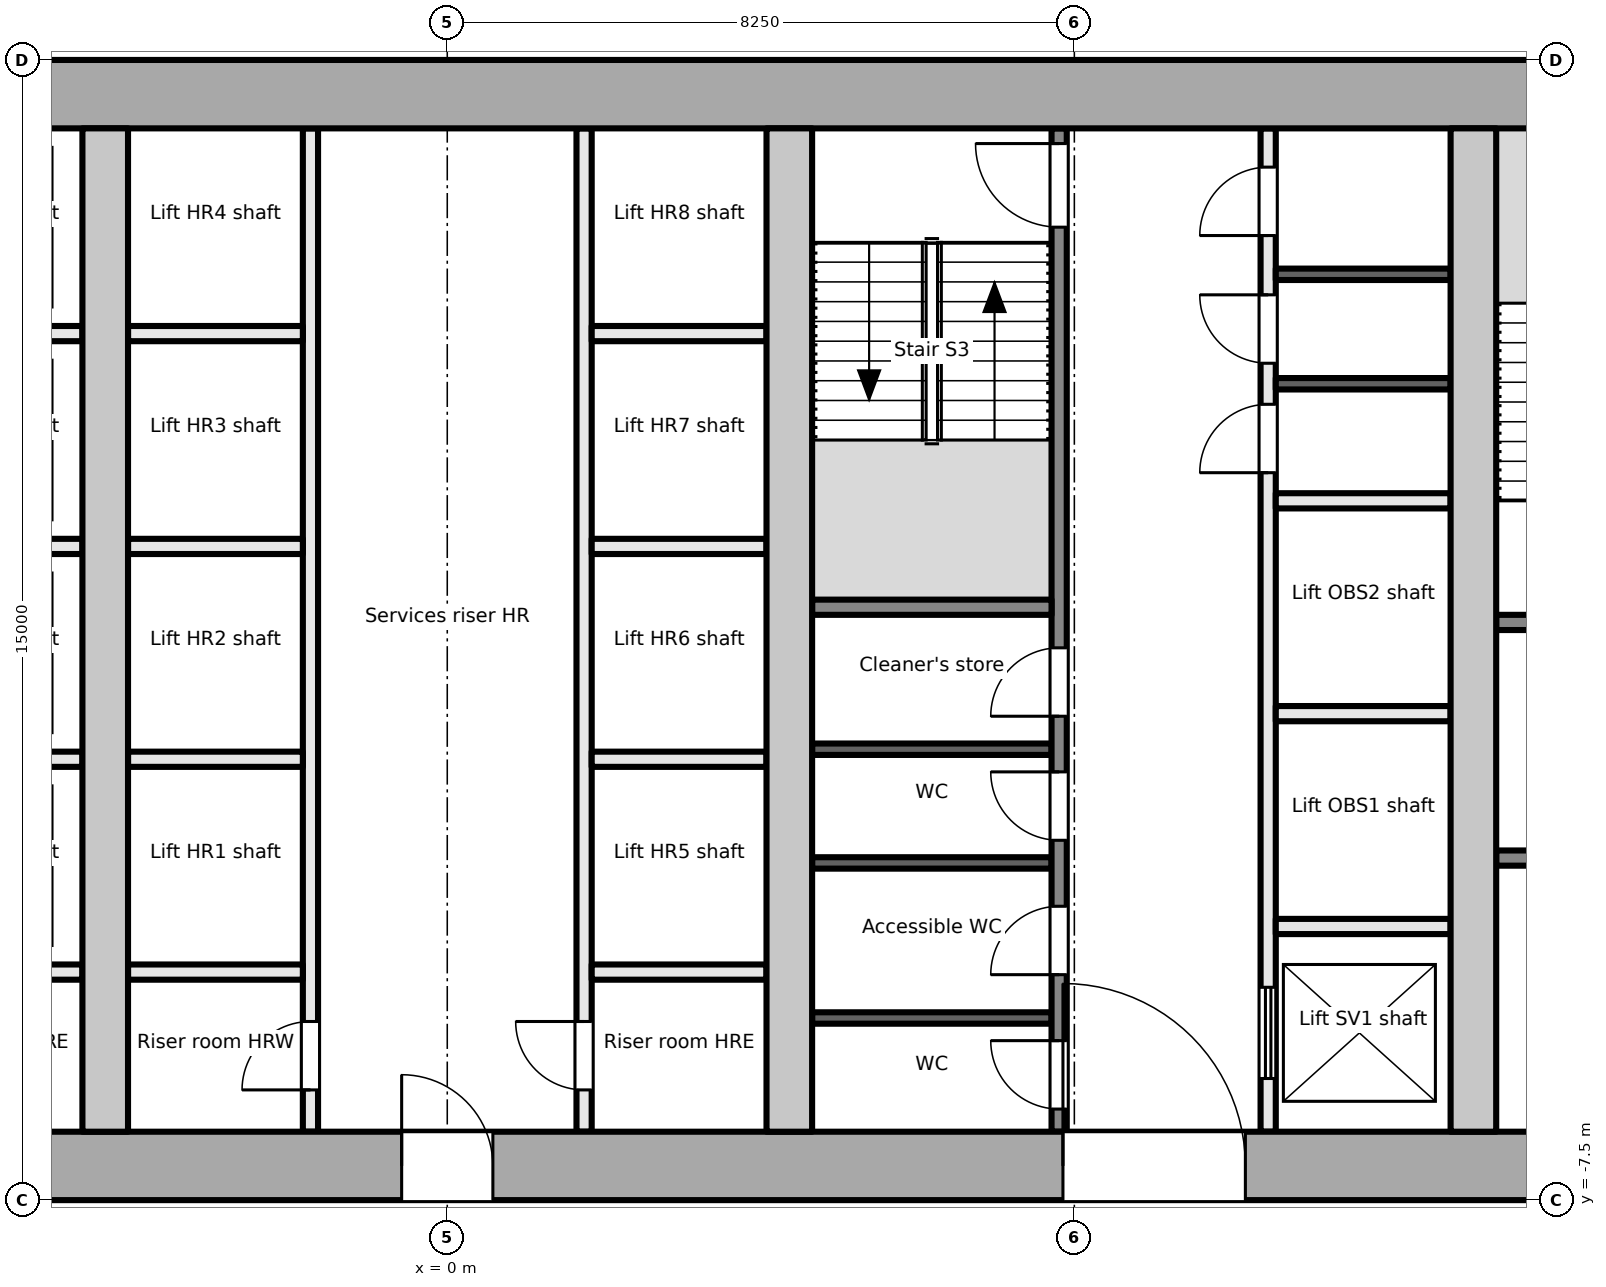
"""IFC4 building model, lengths in metres.
Left out: names, types, materials, properties, quantities, classifications, styles, units other than length and angle.
Written with IfcOpenShell. Run it as: python <this file> out.ifc"""

import sys

from ifc_helpers import new_model, si_unit, direction, frame, frame_2d, origin, place, context, subcontext, project, spatial, rectangle, extrude, element, fill, save


model = new_model("IFC4")
c1 = context("Model", 3, precision=1e-05, world=origin(), true_north=direction((0.0, 1.0)))
c2 = subcontext(c1, "Body", "Model", "MODEL_VIEW")
j1 = project(units=[si_unit("LENGTHUNIT", "METRE"), si_unit("PLANEANGLEUNIT", "RADIAN")], contexts=[c1])
p1 = place(None, origin())
s1 = spatial("IfcSite", under=j1, at=p1, CompositionType="ELEMENT")
p2 = place(p1, origin())
s2 = spatial("IfcBuilding", under=s1, at=p2, CompositionType="ELEMENT")
p3 = place(p2, frame((0.0, 0.0, 57.0)))
s3 = spatial("IfcBuildingStorey", under=s2, at=p3, CompositionType="ELEMENT", Elevation=57.0)
p4 = place(p3, frame((-18.0, -7.05, -0.2), z_axis=(0.0, 0.0, 1.0), x_axis=(1.0, 0.0, 0.0)))
e1 = element("IfcWall", 1, at=p4, inside=s3, PredefinedType="SHEAR", context=c2, shape_type="SweptSolid", body=[
    extrude(rectangle(XDim=36.0, YDim=0.9, at=frame_2d((18.0, 0.0))), origin(), (0.0, 0.0, 1.0), 4.1),
])
p5 = place(p4, frame((7.8, 0.0, 0.2)))
e2 = element("IfcOpeningElement", 2, at=p5, cuts=e1, PredefinedType="OPENING", context=c2, shape_type="SweptSolid", body=[
    extrude(rectangle(XDim=2.4, YDim=2.1, at=frame_2d((1.2, 1.05))), frame((0.0, 0.46, 0.0), z_axis=(0.0, -1.0, 0.0), x_axis=(1.0, 0.0, 0.0)), (0.0, 0.0, 1.0), 0.921),
])
p6 = place(p4, frame((17.4, 0.0, 0.2)))
e3 = element("IfcOpeningElement", 3, at=p6, cuts=e1, PredefinedType="OPENING", context=c2, shape_type="SweptSolid", body=[
    extrude(rectangle(XDim=1.2, YDim=2.1, at=frame_2d((0.6, 1.05))), frame((0.0, 0.46, 0.0), z_axis=(0.0, -1.0, 0.0), x_axis=(1.0, 0.0, 0.0)), (0.0, 0.0, 1.0), 0.921),
])
p7 = place(p4, frame((26.1, 0.0, 0.2)))
e4 = element("IfcOpeningElement", 4, at=p7, cuts=e1, PredefinedType="OPENING", context=c2, shape_type="SweptSolid", body=[
    extrude(rectangle(XDim=2.4, YDim=2.1, at=frame_2d((1.2, 1.05))), frame((0.0, 0.46, 0.0), z_axis=(0.0, -1.0, 0.0), x_axis=(1.0, 0.0, 0.0)), (0.0, 0.0, 1.0), 0.921),
])
p8 = place(p3, frame((-18.0, 7.05, -0.2), z_axis=(0.0, 0.0, 1.0), x_axis=(1.0, 0.0, 0.0)))
e5 = element("IfcWall", 5, at=p8, inside=s3, PredefinedType="SHEAR", context=c2, shape_type="SweptSolid", body=[
    extrude(rectangle(XDim=36.0, YDim=0.9, at=frame_2d((18.0, 0.0))), origin(), (0.0, 0.0, 1.0), 4.1),
])
for number, where, z_axis, x_axis in (
    (6, (-4.5, -6.6, -0.2), (0.0, 0.0, 1.0), (0.0, 1.0, 0.0)),
    (7, (4.5, -6.6, -0.2), (0.0, 0.0, 1.0), (0.0, 1.0, 0.0)),
    (8, (13.5, -6.6, -0.2), (0.0, 0.0, 1.0), (0.0, 1.0, 0.0)),
):
    element("IfcWall", number, at=place(p3, frame(where, z_axis=z_axis, x_axis=x_axis)), inside=s3, PredefinedType="SHEAR", context=c2, shape_type="SweptSolid", body=[
        extrude(rectangle(XDim=13.2, YDim=0.6, at=frame_2d((6.6, 0.0))), origin(), (0.0, 0.0, 1.0), 4.1),
    ])
p9 = place(p3, frame((13.8, -3.0, 0.0), z_axis=(0.0, 0.0, 1.0), x_axis=(1.0, 0.0, 0.0)))
e9 = element("IfcWall", 9, at=p9, inside=s3, PredefinedType="PARTITIONING", context=c2, shape_type="SweptSolid", body=[
    extrude(rectangle(XDim=3.3, YDim=0.2, at=frame_2d((1.65, 0.0))), origin(), (0.0, 0.0, 1.0), 3.9),
])
p10 = place(p9, frame((1.1, 0.0, 0.0)))
e10 = element("IfcOpeningElement", 10, at=p10, cuts=e9, PredefinedType="OPENING", context=c2, shape_type="SweptSolid", body=[
    extrude(rectangle(XDim=1.1, YDim=2.1, at=frame_2d((0.55, 1.05))), frame((0.0, 0.111, 0.0), z_axis=(0.0, -1.0, 0.0), x_axis=(1.0, 0.0, 0.0)), (0.0, 0.0, 1.0), 0.221),
])
p11 = place(p3, frame((13.8, 0.1, 0.0), z_axis=(0.0, 0.0, 1.0), x_axis=(1.0, 0.0, 0.0)))
e11 = element("IfcWall", 11, at=p11, inside=s3, PredefinedType="PARTITIONING", context=c2, shape_type="SweptSolid", body=[
    extrude(rectangle(XDim=3.3, YDim=0.2, at=frame_2d((1.65, 0.0))), origin(), (0.0, 0.0, 1.0), 3.9),
])
p12 = place(p11, frame((1.1, 0.0, 0.0)))
e12 = element("IfcOpeningElement", 12, at=p12, cuts=e11, PredefinedType="OPENING", context=c2, shape_type="SweptSolid", body=[
    extrude(rectangle(XDim=1.1, YDim=2.1, at=frame_2d((0.55, 1.05))), frame((0.0, 0.111, 0.0), z_axis=(0.0, -1.0, 0.0), x_axis=(1.0, 0.0, 0.0)), (0.0, 0.0, 1.0), 0.221),
])
for number, where, z_axis, x_axis in (
    (13, (-7.1, -1.7, 0.0), (0.0, 0.0, 1.0), (1.0, 0.0, 0.0)),
    (14, (-7.1, 1.1, 0.0), (0.0, 0.0, 1.0), (1.0, 0.0, 0.0)),
    (15, (-7.1, 3.9, 0.0), (0.0, 0.0, 1.0), (1.0, 0.0, 0.0)),
    (16, (-7.1, -4.5, 0.0), (0.0, 0.0, 1.0), (1.0, 0.0, 0.0)),
):
    element("IfcWall", number, at=place(p3, frame(where, z_axis=z_axis, x_axis=x_axis)), inside=s3, PredefinedType="PARTITIONING", context=c2, shape_type="SweptSolid", body=[
        extrude(rectangle(XDim=2.3, YDim=0.2, at=frame_2d((1.15, 0.0))), origin(), (0.0, 0.0, 1.0), 3.9),
    ])
p13 = place(p3, frame((-1.8, -6.6, 0.0), z_axis=(0.0, 0.0, 1.0), x_axis=(0.0, 1.0, 0.0)))
e17 = element("IfcWall", 17, at=p13, inside=s3, PredefinedType="PARTITIONING", context=c2, shape_type="SweptSolid", body=[
    extrude(rectangle(XDim=13.2, YDim=0.2, at=frame_2d((6.6, 0.0))), origin(), (0.0, 0.0, 1.0), 3.9),
])
p14 = place(p13, frame((0.55, 0.0, 0.0)))
e18 = element("IfcOpeningElement", 18, at=p14, cuts=e17, PredefinedType="OPENING", context=c2, shape_type="SweptSolid", body=[
    extrude(rectangle(XDim=0.9, YDim=2.1, at=frame_2d((0.45, 1.05))), frame((0.0, 0.111, 0.0), z_axis=(0.0, -1.0, 0.0), x_axis=(1.0, 0.0, 0.0)), (0.0, 0.0, 1.0), 0.221),
])
p15 = place(p3, frame((1.8, -6.6, 0.0), z_axis=(0.0, 0.0, 1.0), x_axis=(0.0, 1.0, 0.0)))
e19 = element("IfcWall", 19, at=p15, inside=s3, PredefinedType="PARTITIONING", context=c2, shape_type="SweptSolid", body=[
    extrude(rectangle(XDim=13.2, YDim=0.2, at=frame_2d((6.6, 0.0))), origin(), (0.0, 0.0, 1.0), 3.9),
])
p16 = place(p15, frame((0.55, 0.0, 0.0)))
e20 = element("IfcOpeningElement", 20, at=p16, cuts=e19, PredefinedType="OPENING", context=c2, shape_type="SweptSolid", body=[
    extrude(rectangle(XDim=0.9, YDim=2.1, at=frame_2d((0.45, 1.05))), frame((0.0, 0.111, 0.0), z_axis=(0.0, -1.0, 0.0), x_axis=(1.0, 0.0, 0.0)), (0.0, 0.0, 1.0), 0.221),
])
for number, where, z_axis, x_axis in (
    (21, (-4.2, -1.7, 0.0), (0.0, 0.0, 1.0), (1.0, 0.0, 0.0)),
    (22, (-4.2, 1.1, 0.0), (0.0, 0.0, 1.0), (1.0, 0.0, 0.0)),
    (23, (-4.2, 3.9, 0.0), (0.0, 0.0, 1.0), (1.0, 0.0, 0.0)),
    (24, (-4.2, -4.5, 0.0), (0.0, 0.0, 1.0), (1.0, 0.0, 0.0)),
    (25, (1.9, -1.7, 0.0), (0.0, 0.0, 1.0), (1.0, 0.0, 0.0)),
    (26, (1.9, 1.1, 0.0), (0.0, 0.0, 1.0), (1.0, 0.0, 0.0)),
    (27, (1.9, 3.9, 0.0), (0.0, 0.0, 1.0), (1.0, 0.0, 0.0)),
    (28, (1.9, -4.5, 0.0), (0.0, 0.0, 1.0), (1.0, 0.0, 0.0)),
):
    element("IfcWall", number, at=place(p3, frame(where, z_axis=z_axis, x_axis=x_axis)), inside=s3, PredefinedType="PARTITIONING", context=c2, shape_type="SweptSolid", body=[
        extrude(rectangle(XDim=2.3, YDim=0.2, at=frame_2d((1.15, 0.0))), origin(), (0.0, 0.0, 1.0), 3.9),
    ])
p17 = place(p3, frame((8.05, -6.6, 0.0), z_axis=(0.0, 0.0, 1.0), x_axis=(0.0, 1.0, 0.0)))
e29 = element("IfcWall", 29, at=p17, inside=s3, PredefinedType="PARTITIONING", context=c2, shape_type="SweptSolid", body=[
    extrude(rectangle(XDim=13.2, YDim=0.2, at=frame_2d((6.6, 0.0))), origin(), (0.0, 0.0, 1.0), 3.9),
])
p18 = place(p17, frame((0.298, 0.0, 0.0)))
e30 = element("IfcOpeningElement", 30, at=p18, cuts=e29, PredefinedType="OPENING", context=c2, shape_type="SweptSolid", body=[
    extrude(rectangle(XDim=0.9, YDim=2.1, at=frame_2d((0.45, 1.05))), frame((0.0, 0.111, 0.0), z_axis=(0.0, -1.0, 0.0), x_axis=(1.0, 0.0, 0.0)), (0.0, 0.0, 1.0), 0.221),
])
p19 = place(p17, frame((2.066, 0.0, 0.0)))
e31 = element("IfcOpeningElement", 31, at=p19, cuts=e29, PredefinedType="OPENING", context=c2, shape_type="SweptSolid", body=[
    extrude(rectangle(XDim=0.9, YDim=2.1, at=frame_2d((0.45, 1.05))), frame((0.0, 0.111, 0.0), z_axis=(0.0, -1.0, 0.0), x_axis=(1.0, 0.0, 0.0)), (0.0, 0.0, 1.0), 0.221),
])
p20 = place(p17, frame((3.834, 0.0, 0.0)))
e32 = element("IfcOpeningElement", 32, at=p20, cuts=e29, PredefinedType="OPENING", context=c2, shape_type="SweptSolid", body=[
    extrude(rectangle(XDim=0.9, YDim=2.1, at=frame_2d((0.45, 1.05))), frame((0.0, 0.111, 0.0), z_axis=(0.0, -1.0, 0.0), x_axis=(1.0, 0.0, 0.0)), (0.0, 0.0, 1.0), 0.221),
])
p21 = place(p17, frame((5.466, 0.0, 0.0)))
e33 = element("IfcOpeningElement", 33, at=p21, cuts=e29, PredefinedType="OPENING", context=c2, shape_type="SweptSolid", body=[
    extrude(rectangle(XDim=0.9, YDim=2.1, at=frame_2d((0.45, 1.05))), frame((0.0, 0.111, 0.0), z_axis=(0.0, -1.0, 0.0), x_axis=(1.0, 0.0, 0.0)), (0.0, 0.0, 1.0), 0.221),
])
p22 = place(p17, frame((11.9, 0.0, 0.0)))
e34 = element("IfcOpeningElement", 34, at=p22, cuts=e29, PredefinedType="OPENING", context=c2, shape_type="SweptSolid", body=[
    extrude(rectangle(XDim=1.1, YDim=2.1, at=frame_2d((0.55, 1.05))), frame((0.0, 0.111, 0.0), z_axis=(0.0, -1.0, 0.0), x_axis=(1.0, 0.0, 0.0)), (0.0, 0.0, 1.0), 0.221),
])
p23 = place(p3, frame((10.8, -6.6, 0.0), z_axis=(0.0, 0.0, 1.0), x_axis=(0.0, 1.0, 0.0)))
e35 = element("IfcWall", 35, at=p23, inside=s3, PredefinedType="PARTITIONING", context=c2, shape_type="SweptSolid", body=[
    extrude(rectangle(XDim=13.2, YDim=0.2, at=frame_2d((6.6, 0.0))), origin(), (0.0, 0.0, 1.0), 3.9),
])
p24 = place(p23, frame((0.7, 0.0, 0.0)))
e36 = element("IfcOpeningElement", 36, at=p24, cuts=e35, PredefinedType="OPENING", context=c2, shape_type="SweptSolid", body=[
    extrude(rectangle(XDim=1.2, YDim=2.1, at=frame_2d((0.6, 1.05))), frame((0.0, 0.111, 0.0), z_axis=(0.0, -1.0, 0.0), x_axis=(1.0, 0.0, 0.0)), (0.0, 0.0, 1.0), 0.221),
])
p25 = place(p23, frame((8.67, 0.0, 0.0)))
e37 = element("IfcOpeningElement", 37, at=p25, cuts=e35, PredefinedType="OPENING", context=c2, shape_type="SweptSolid", body=[
    extrude(rectangle(XDim=0.9, YDim=2.1, at=frame_2d((0.45, 1.05))), frame((0.0, 0.111, 0.0), z_axis=(0.0, -1.0, 0.0), x_axis=(1.0, 0.0, 0.0)), (0.0, 0.0, 1.0), 0.221),
])
p26 = place(p23, frame((10.11, 0.0, 0.0)))
e38 = element("IfcOpeningElement", 38, at=p26, cuts=e35, PredefinedType="OPENING", context=c2, shape_type="SweptSolid", body=[
    extrude(rectangle(XDim=0.9, YDim=2.1, at=frame_2d((0.45, 1.05))), frame((0.0, 0.111, 0.0), z_axis=(0.0, -1.0, 0.0), x_axis=(1.0, 0.0, 0.0)), (0.0, 0.0, 1.0), 0.221),
])
p27 = place(p23, frame((11.79, 0.0, 0.0)))
e39 = element("IfcOpeningElement", 39, at=p27, cuts=e35, PredefinedType="OPENING", context=c2, shape_type="SweptSolid", body=[
    extrude(rectangle(XDim=0.9, YDim=2.1, at=frame_2d((0.45, 1.05))), frame((0.0, 0.111, 0.0), z_axis=(0.0, -1.0, 0.0), x_axis=(1.0, 0.0, 0.0)), (0.0, 0.0, 1.0), 0.221),
])
p28 = place(p3, frame((4.8, 0.3, 0.0), z_axis=(0.0, 0.0, 1.0), x_axis=(1.0, 0.0, 0.0)))
e40 = element("IfcWall", 40, at=p28, inside=s3, PredefinedType="PARTITIONING", context=c2, shape_type="SweptSolid", body=[
    extrude(rectangle(XDim=3.15, YDim=0.2, at=frame_2d((1.575, 0.0))), origin(), (0.0, 0.0, 1.0), 3.9),
])
for number, where, z_axis, x_axis in (
    (41, (4.8, -5.104, 0.0), (0.0, 0.0, 1.0), (1.0, 0.0, 0.0)),
    (42, (4.8, -3.064, 0.0), (0.0, 0.0, 1.0), (1.0, 0.0, 0.0)),
    (43, (4.8, -1.568, 0.0), (0.0, 0.0, 1.0), (1.0, 0.0, 0.0)),
):
    element("IfcWall", number, at=place(p3, frame(where, z_axis=z_axis, x_axis=x_axis)), inside=s3, PredefinedType="PARTITIONING", context=c2, shape_type="SweptSolid", body=[
        extrude(rectangle(XDim=3.15, YDim=0.15, at=frame_2d((1.575, 0.0))), origin(), (0.0, 0.0, 1.0), 3.9),
    ])
for number, where, z_axis, x_axis in (
    (44, (10.9, -3.9, 0.0), (0.0, 0.0, 1.0), (1.0, 0.0, 0.0)),
    (45, (10.9, -1.1, 0.0), (0.0, 0.0, 1.0), (1.0, 0.0, 0.0)),
    (46, (10.9, 1.7, 0.0), (0.0, 0.0, 1.0), (1.0, 0.0, 0.0)),
):
    element("IfcWall", number, at=place(p3, frame(where, z_axis=z_axis, x_axis=x_axis)), inside=s3, PredefinedType="PARTITIONING", context=c2, shape_type="SweptSolid", body=[
        extrude(rectangle(XDim=2.3, YDim=0.2, at=frame_2d((1.15, 0.0))), origin(), (0.0, 0.0, 1.0), 3.9),
    ])
for number, where, z_axis, x_axis in (
    (47, (10.9, 3.24, 0.0), (0.0, 0.0, 1.0), (1.0, 0.0, 0.0)),
    (48, (10.9, 4.68, 0.0), (0.0, 0.0, 1.0), (1.0, 0.0, 0.0)),
):
    element("IfcWall", number, at=place(p3, frame(where, z_axis=z_axis, x_axis=x_axis)), inside=s3, PredefinedType="PARTITIONING", context=c2, shape_type="SweptSolid", body=[
        extrude(rectangle(XDim=2.3, YDim=0.15, at=frame_2d((1.15, 0.0))), origin(), (0.0, 0.0, 1.0), 3.9),
    ])
p29 = place(p14, origin())
e49 = element("IfcDoor", 49, at=p29, inside=s3, OperationType="SINGLE_SWING_LEFT", PredefinedType="DOOR", context=c2, shape_type="SweptSolid", body=[
    extrude(rectangle(XDim=0.9, YDim=2.1, at=frame_2d((0.45, 1.05))), frame((0.0, 0.025, 0.0), z_axis=(0.0, -1.0, 0.0), x_axis=(1.0, 0.0, 0.0)), (0.0, 0.0, 1.0), 0.05),
])
fill(e18, e49)
p30 = place(p16, origin())
e50 = element("IfcDoor", 50, at=p30, inside=s3, OperationType="SINGLE_SWING_RIGHT", PredefinedType="DOOR", context=c2, shape_type="SweptSolid", body=[
    extrude(rectangle(XDim=0.9, YDim=2.1, at=frame_2d((0.45, 1.05))), frame((0.0, 0.025, 0.0), z_axis=(0.0, -1.0, 0.0), x_axis=(1.0, 0.0, 0.0)), (0.0, 0.0, 1.0), 0.05),
])
fill(e20, e50)
p31 = place(p6, origin())
e51 = element("IfcDoor", 51, at=p31, inside=s3, OperationType="SINGLE_SWING_LEFT", PredefinedType="DOOR", context=c2, shape_type="SweptSolid", body=[
    extrude(rectangle(XDim=1.2, YDim=2.1, at=frame_2d((0.6, 1.05))), frame((0.0, 0.025, 0.0), z_axis=(0.0, -1.0, 0.0), x_axis=(1.0, 0.0, 0.0)), (0.0, 0.0, 1.0), 0.05),
])
fill(e3, e51)
p32 = place(p18, origin())
e52 = element("IfcDoor", 52, at=p32, inside=s3, OperationType="SINGLE_SWING_RIGHT", PredefinedType="DOOR", context=c2, shape_type="SweptSolid", body=[
    extrude(rectangle(XDim=0.9, YDim=2.1, at=frame_2d((0.45, 1.05))), frame((0.0, 0.025, 0.0), z_axis=(0.0, -1.0, 0.0), x_axis=(1.0, 0.0, 0.0)), (0.0, 0.0, 1.0), 0.05),
])
fill(e30, e52)
p33 = place(p19, origin())
e53 = element("IfcDoor", 53, at=p33, inside=s3, OperationType="SINGLE_SWING_LEFT", PredefinedType="DOOR", context=c2, shape_type="SweptSolid", body=[
    extrude(rectangle(XDim=0.9, YDim=2.1, at=frame_2d((0.45, 1.05))), frame((0.0, 0.025, 0.0), z_axis=(0.0, -1.0, 0.0), x_axis=(1.0, 0.0, 0.0)), (0.0, 0.0, 1.0), 0.05),
])
fill(e31, e53)
p34 = place(p20, origin())
e54 = element("IfcDoor", 54, at=p34, inside=s3, OperationType="SINGLE_SWING_RIGHT", PredefinedType="DOOR", context=c2, shape_type="SweptSolid", body=[
    extrude(rectangle(XDim=0.9, YDim=2.1, at=frame_2d((0.45, 1.05))), frame((0.0, 0.025, 0.0), z_axis=(0.0, -1.0, 0.0), x_axis=(1.0, 0.0, 0.0)), (0.0, 0.0, 1.0), 0.05),
])
fill(e32, e54)
p35 = place(p21, origin())
e55 = element("IfcDoor", 55, at=p35, inside=s3, OperationType="SINGLE_SWING_LEFT", PredefinedType="DOOR", context=c2, shape_type="SweptSolid", body=[
    extrude(rectangle(XDim=0.9, YDim=2.1, at=frame_2d((0.45, 1.05))), frame((0.0, 0.025, 0.0), z_axis=(0.0, -1.0, 0.0), x_axis=(1.0, 0.0, 0.0)), (0.0, 0.0, 1.0), 0.05),
])
fill(e33, e55)
p36 = place(p22, origin())
e56 = element("IfcDoor", 56, at=p36, inside=s3, OperationType="SINGLE_SWING_RIGHT", PredefinedType="DOOR", context=c2, shape_type="SweptSolid", body=[
    extrude(rectangle(XDim=1.1, YDim=2.1, at=frame_2d((0.55, 1.05))), frame((0.0, 0.025, 0.0), z_axis=(0.0, -1.0, 0.0), x_axis=(1.0, 0.0, 0.0)), (0.0, 0.0, 1.0), 0.05),
])
fill(e34, e56)
p37 = place(p7, origin())
e57 = element("IfcDoor", 57, at=p37, inside=s3, OperationType="DOUBLE_DOOR_DOUBLE_SWING", PredefinedType="DOOR", context=c2, shape_type="SweptSolid", body=[
    extrude(rectangle(XDim=2.4, YDim=2.1, at=frame_2d((1.2, 1.05))), frame((0.0, 0.025, 0.0), z_axis=(0.0, -1.0, 0.0), x_axis=(1.0, 0.0, 0.0)), (0.0, 0.0, 1.0), 0.05),
])
fill(e4, e57)
p38 = place(p24, origin())
e58 = element("IfcDoor", 58, at=p38, inside=s3, OperationType="DOUBLE_DOOR_SLIDING", PredefinedType="DOOR", context=c2, shape_type="SweptSolid", body=[
    extrude(rectangle(XDim=1.2, YDim=2.1, at=frame_2d((0.6, 1.05))), frame((0.0, 0.025, 0.0), z_axis=(0.0, -1.0, 0.0), x_axis=(1.0, 0.0, 0.0)), (0.0, 0.0, 1.0), 0.05),
])
fill(e36, e58)
p39 = place(p25, origin())
e59 = element("IfcDoor", 59, at=p39, inside=s3, OperationType="SINGLE_SWING_LEFT", PredefinedType="DOOR", context=c2, shape_type="SweptSolid", body=[
    extrude(rectangle(XDim=0.9, YDim=2.1, at=frame_2d((0.45, 1.05))), frame((0.0, 0.025, 0.0), z_axis=(0.0, -1.0, 0.0), x_axis=(1.0, 0.0, 0.0)), (0.0, 0.0, 1.0), 0.05),
])
fill(e37, e59)
p40 = place(p26, origin())
e60 = element("IfcDoor", 60, at=p40, inside=s3, OperationType="SINGLE_SWING_RIGHT", PredefinedType="DOOR", context=c2, shape_type="SweptSolid", body=[
    extrude(rectangle(XDim=0.9, YDim=2.1, at=frame_2d((0.45, 1.05))), frame((0.0, 0.025, 0.0), z_axis=(0.0, -1.0, 0.0), x_axis=(1.0, 0.0, 0.0)), (0.0, 0.0, 1.0), 0.05),
])
fill(e38, e60)
p41 = place(p27, origin())
e61 = element("IfcDoor", 61, at=p41, inside=s3, OperationType="SINGLE_SWING_LEFT", PredefinedType="DOOR", context=c2, shape_type="SweptSolid", body=[
    extrude(rectangle(XDim=0.9, YDim=2.1, at=frame_2d((0.45, 1.05))), frame((0.0, 0.025, 0.0), z_axis=(0.0, -1.0, 0.0), x_axis=(1.0, 0.0, 0.0)), (0.0, 0.0, 1.0), 0.05),
])
fill(e39, e61)
save(model, sys.argv[1])
